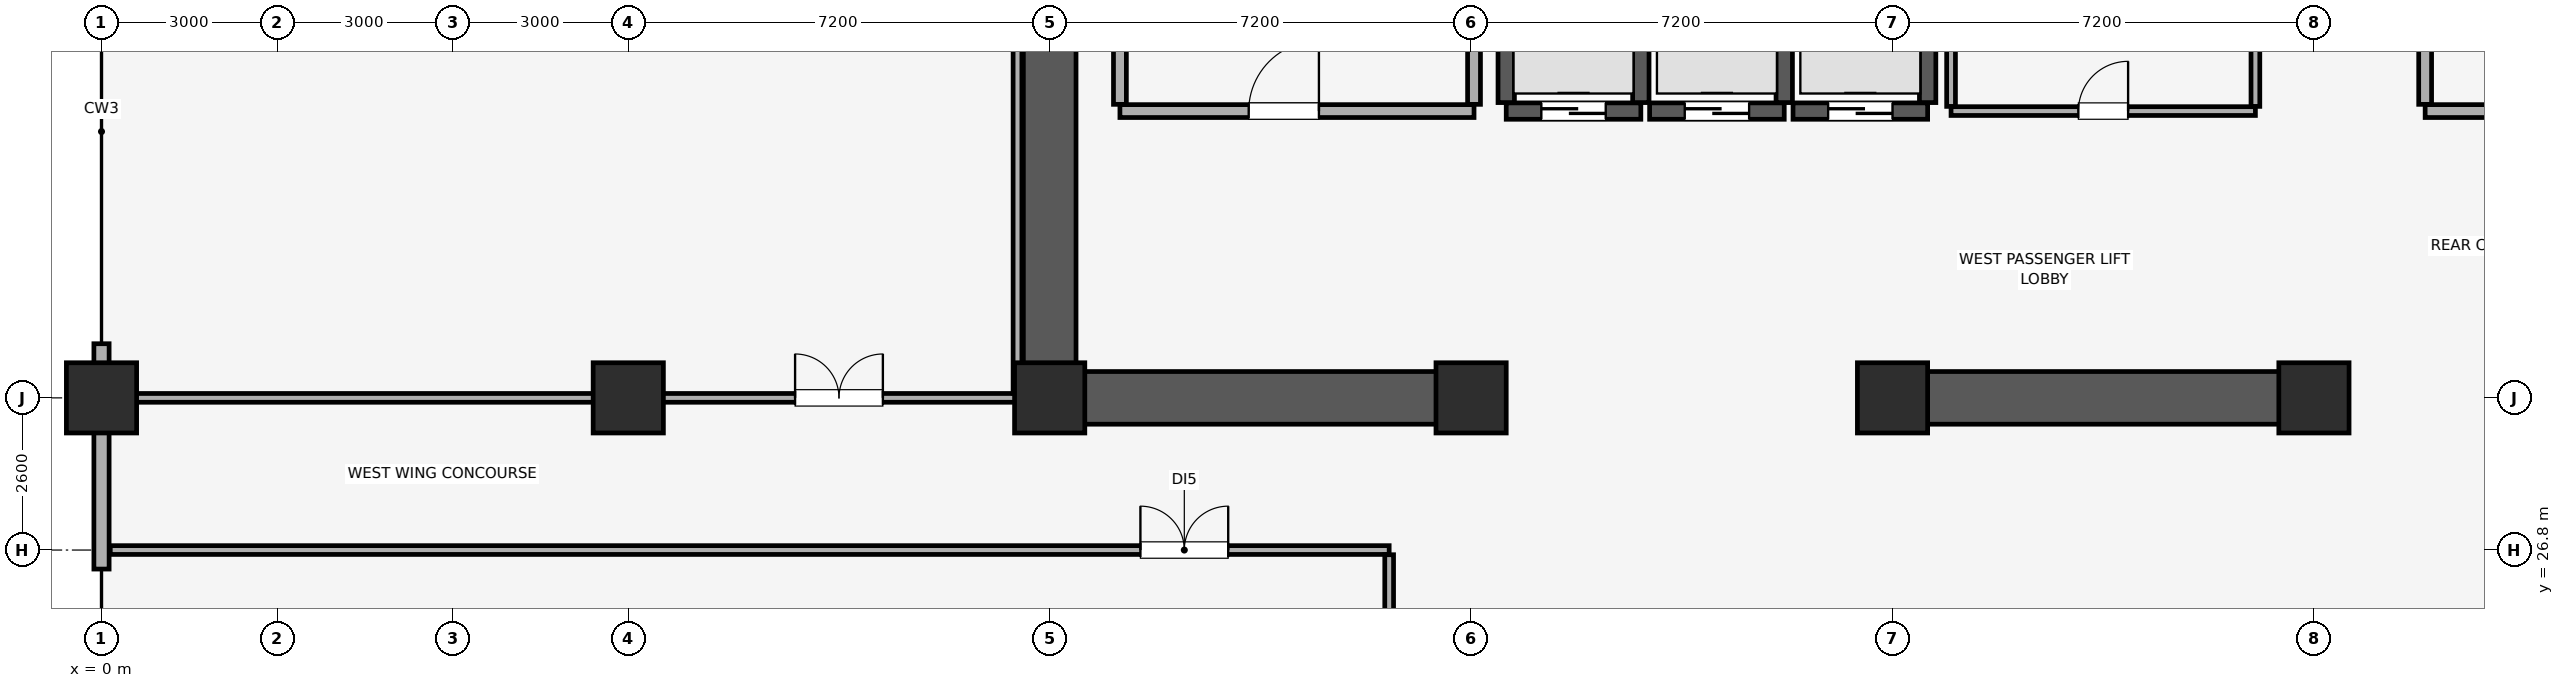
"""IFC4 building model, lengths in metres.
Left out: names, types, materials, properties, quantities, classifications, styles, units other than length and angle.
Written with IfcOpenShell. Run it as: python <this file> out.ifc"""

import sys

from ifc_helpers import new_model, si_unit, direction, frame, frame_2d, origin, origin_2d, place, context, subcontext, project, spatial, rectangle, extrude, element, fill, save


model = new_model("IFC4")
c1 = context("Model", 3, precision=1e-05, world=origin(), true_north=direction((0.0, 1.0)))
c2 = subcontext(c1, "Body", "Model", "MODEL_VIEW")
j1 = project(units=[si_unit("LENGTHUNIT", "METRE"), si_unit("PLANEANGLEUNIT", "RADIAN")], contexts=[c1])
p1 = place(None, origin())
s1 = spatial("IfcSite", under=j1, at=p1, CompositionType="ELEMENT")
p2 = place(p1, origin())
s2 = spatial("IfcBuilding", under=s1, at=p2, CompositionType="ELEMENT")
p3 = place(p2, frame((0.0, 0.0, 130.55)))
s3 = spatial("IfcBuildingStorey", under=s2, at=p3, CompositionType="ELEMENT", Elevation=130.55)
for number, where, z_axis, x_axis in (
    (1, (0.0, 29.4, 0.0), (0.0, 0.0, 1.0), (1.0, 0.0, 0.0)),
    (2, (9.0, 29.4, 0.0), (0.0, 0.0, 1.0), (1.0, 0.0, 0.0)),
    (3, (16.2, 29.4, 0.0), (0.0, 0.0, 1.0), (1.0, 0.0, 0.0)),
    (4, (23.4, 29.4, 0.0), (0.0, 0.0, 1.0), (1.0, 0.0, 0.0)),
    (5, (30.6, 29.4, 0.0), (0.0, 0.0, 1.0), (1.0, 0.0, 0.0)),
    (6, (37.8, 29.4, 0.0), (0.0, 0.0, 1.0), (1.0, 0.0, 0.0)),
):
    element("IfcColumn", number, at=place(p3, frame(where, z_axis=z_axis, x_axis=x_axis)), inside=s3, PredefinedType="COLUMN", context=c2, shape_type="SweptSolid", body=[
        extrude(rectangle(XDim=1.2, YDim=1.2, at=origin_2d()), origin(), (0.0, 0.0, 1.0), 4.56),
    ])
p4 = place(p3, frame((0.0, 30.325, 0.0), z_axis=(0.0, 0.0, 1.0), x_axis=(0.0, -1.0, 0.0)))
e7 = element("IfcWall", 7, at=p4, inside=s3, PredefinedType="SOLIDWALL", context=c2, shape_type="SweptSolid", body=[
    extrude(rectangle(XDim=3.85, YDim=0.26, at=frame_2d((1.925, 0.0))), origin(), (0.0, 0.0, 1.0), 4.52),
])
p5 = place(p3, frame((16.2, 29.4, 0.0), z_axis=(0.0, 0.0, 1.0), x_axis=(0.0, 1.0, 0.0)))
e8 = element("IfcWall", 8, at=p5, inside=s3, PredefinedType="SHEAR", context=c2, shape_type="SweptSolid", body=[
    extrude(rectangle(XDim=19.2, YDim=0.9, at=frame_2d((9.6, 0.0))), origin(), (0.0, 0.0, 1.0), 4.52),
])
p6 = place(p3, frame((16.655, 29.4, 0.0), z_axis=(0.0, 0.0, 1.0), x_axis=(1.0, 0.0, 0.0)))
e9 = element("IfcWall", 9, at=p6, inside=s3, PredefinedType="SHEAR", context=c2, shape_type="SweptSolid", body=[
    extrude(rectangle(XDim=6.945, YDim=0.9, at=frame_2d((3.473, 0.0))), origin(), (0.0, 0.0, 1.0), 4.52),
])
p7 = place(p3, frame((30.4, 29.4, 0.0), z_axis=(0.0, 0.0, 1.0), x_axis=(1.0, 0.0, 0.0)))
e10 = element("IfcWall", 10, at=p7, inside=s3, PredefinedType="SHEAR", context=c2, shape_type="SweptSolid", body=[
    extrude(rectangle(XDim=7.6, YDim=0.9, at=frame_2d((3.8, 0.0))), origin(), (0.0, 0.0, 1.0), 4.52),
])
p8 = place(p3, frame((24.0, 34.3, 0.0), z_axis=(0.0, 0.0, 1.0), x_axis=(1.0, 0.0, 0.0)))
e11 = element("IfcWall", 11, at=p8, inside=s3, PredefinedType="SHEAR", context=c2, shape_type="SweptSolid", body=[
    extrude(rectangle(XDim=2.3, YDim=0.28, at=frame_2d((1.15, 0.0))), origin(), (0.0, 0.0, 1.0), 4.52),
])
p9 = place(p8, frame((0.6, 0.0, 0.0)))
e12 = element("IfcOpeningElement", 12, at=p9, cuts=e11, PredefinedType="OPENING", context=c2, shape_type="SweptSolid", body=[
    extrude(rectangle(XDim=1.1, YDim=2.2, at=frame_2d((0.55, 1.1))), frame((0.0, 0.15, 0.0), z_axis=(0.0, -1.0, 0.0), x_axis=(1.0, 0.0, 0.0)), (0.0, 0.0, 1.0), 0.3),
])
for number, where, z_axis, x_axis in (
    (13, (24.0, 34.445, 0.0), (0.0, 0.0, 1.0), (0.0, 1.0, 0.0)),
    (14, (26.3, 34.445, 0.0), (0.0, 0.0, 1.0), (0.0, 1.0, 0.0)),
):
    element("IfcWall", number, at=place(p3, frame(where, z_axis=z_axis, x_axis=x_axis)), inside=s3, PredefinedType="SHEAR", context=c2, shape_type="SweptSolid", body=[
        extrude(rectangle(XDim=2.01, YDim=0.28, at=frame_2d((1.005, 0.0))), origin(), (0.0, 0.0, 1.0), 4.52),
    ])
p10 = place(p3, frame((26.45, 34.3, 0.0), z_axis=(0.0, 0.0, 1.0), x_axis=(1.0, 0.0, 0.0)))
e15 = element("IfcWall", 15, at=p10, inside=s3, PredefinedType="SHEAR", context=c2, shape_type="SweptSolid", body=[
    extrude(rectangle(XDim=2.3, YDim=0.28, at=frame_2d((1.15, 0.0))), origin(), (0.0, 0.0, 1.0), 4.52),
])
p11 = place(p10, frame((0.6, 0.0, 0.0)))
e16 = element("IfcOpeningElement", 16, at=p11, cuts=e15, PredefinedType="OPENING", context=c2, shape_type="SweptSolid", body=[
    extrude(rectangle(XDim=1.1, YDim=2.2, at=frame_2d((0.55, 1.1))), frame((0.0, 0.15, 0.0), z_axis=(0.0, -1.0, 0.0), x_axis=(1.0, 0.0, 0.0)), (0.0, 0.0, 1.0), 0.3),
])
p12 = place(p3, frame((28.75, 34.445, 0.0), z_axis=(0.0, 0.0, 1.0), x_axis=(0.0, 1.0, 0.0)))
e17 = element("IfcWall", 17, at=p12, inside=s3, PredefinedType="SHEAR", context=c2, shape_type="SweptSolid", body=[
    extrude(rectangle(XDim=2.01, YDim=0.28, at=frame_2d((1.005, 0.0))), origin(), (0.0, 0.0, 1.0), 4.52),
])
p13 = place(p3, frame((28.9, 34.3, 0.0), z_axis=(0.0, 0.0, 1.0), x_axis=(1.0, 0.0, 0.0)))
e18 = element("IfcWall", 18, at=p13, inside=s3, PredefinedType="SHEAR", context=c2, shape_type="SweptSolid", body=[
    extrude(rectangle(XDim=2.3, YDim=0.28, at=frame_2d((1.15, 0.0))), origin(), (0.0, 0.0, 1.0), 4.52),
])
p14 = place(p13, frame((0.6, 0.0, 0.0)))
e19 = element("IfcOpeningElement", 19, at=p14, cuts=e18, PredefinedType="OPENING", context=c2, shape_type="SweptSolid", body=[
    extrude(rectangle(XDim=1.1, YDim=2.2, at=frame_2d((0.55, 1.1))), frame((0.0, 0.15, 0.0), z_axis=(0.0, -1.0, 0.0), x_axis=(1.0, 0.0, 0.0)), (0.0, 0.0, 1.0), 0.3),
])
p15 = place(p3, frame((31.2, 34.445, 0.0), z_axis=(0.0, 0.0, 1.0), x_axis=(0.0, 1.0, 0.0)))
e20 = element("IfcWall", 20, at=p15, inside=s3, PredefinedType="SHEAR", context=c2, shape_type="SweptSolid", body=[
    extrude(rectangle(XDim=2.01, YDim=0.28, at=frame_2d((1.005, 0.0))), origin(), (0.0, 0.0, 1.0), 4.52),
])
p16 = place(p3, frame((17.4, 34.3, 0.0), z_axis=(0.0, 0.0, 1.0), x_axis=(1.0, 0.0, 0.0)))
e21 = element("IfcWall", 21, at=p16, inside=s3, PredefinedType="PARTITIONING", context=c2, shape_type="SweptSolid", body=[
    extrude(rectangle(XDim=6.05, YDim=0.22, at=frame_2d((3.025, 0.0))), origin(), (0.0, 0.0, 1.0), 4.52),
])
p17 = place(p16, frame((2.2, 0.0, 0.0)))
e22 = element("IfcOpeningElement", 22, at=p17, cuts=e21, PredefinedType="OPENING", context=c2, shape_type="SweptSolid", body=[
    extrude(rectangle(XDim=1.2, YDim=2.15, at=frame_2d((0.6, 1.075))), frame((0.0, 0.12, 0.0), z_axis=(0.0, -1.0, 0.0), x_axis=(1.0, 0.0, 0.0)), (0.0, 0.0, 1.0), 0.24),
])
p18 = place(p3, frame((17.4, 34.415, 0.0), z_axis=(0.0, 0.0, 1.0), x_axis=(0.0, 1.0, 0.0)))
e23 = element("IfcWall", 23, at=p18, inside=s3, PredefinedType="PARTITIONING", context=c2, shape_type="SweptSolid", body=[
    extrude(rectangle(XDim=5.43, YDim=0.22, at=frame_2d((2.715, 0.0))), origin(), (0.0, 0.0, 1.0), 4.52),
])
p19 = place(p3, frame((23.45, 34.415, 0.0), z_axis=(0.0, 0.0, 1.0), x_axis=(0.0, 1.0, 0.0)))
e24 = element("IfcWall", 24, at=p19, inside=s3, PredefinedType="PARTITIONING", context=c2, shape_type="SweptSolid", body=[
    extrude(rectangle(XDim=5.64, YDim=0.22, at=frame_2d((2.82, 0.0))), origin(), (0.0, 0.0, 1.0), 4.52),
])
p20 = place(p3, frame((39.7, 34.3, 0.0), z_axis=(0.0, 0.0, 1.0), x_axis=(1.0, 0.0, 0.0)))
e25 = element("IfcWall", 25, at=p20, inside=s3, PredefinedType="PARTITIONING", context=c2, shape_type="SweptSolid", body=[
    extrude(rectangle(XDim=4.6, YDim=0.22, at=frame_2d((2.3, 0.0))), origin(), (0.0, 0.0, 1.0), 4.52),
])
p21 = place(p20, frame((1.7, 0.0, 0.0)))
e26 = element("IfcOpeningElement", 26, at=p21, cuts=e25, PredefinedType="OPENING", context=c2, shape_type="SweptSolid", body=[
    extrude(rectangle(XDim=1.2, YDim=2.15, at=frame_2d((0.6, 1.075))), frame((0.0, 0.12, 0.0), z_axis=(0.0, -1.0, 0.0), x_axis=(1.0, 0.0, 0.0)), (0.0, 0.0, 1.0), 0.24),
])
p22 = place(p3, frame((39.7, 34.415, 0.0), z_axis=(0.0, 0.0, 1.0), x_axis=(0.0, 1.0, 0.0)))
e27 = element("IfcWall", 27, at=p22, inside=s3, PredefinedType="PARTITIONING", context=c2, shape_type="SweptSolid", body=[
    extrude(rectangle(XDim=5.785, YDim=0.22, at=frame_2d((2.893, 0.0))), origin(), (0.0, 0.0, 1.0), 4.52),
])
p23 = place(p3, frame((31.6, 34.3, 0.0), z_axis=(0.0, 0.0, 1.0), x_axis=(1.0, 0.0, 0.0)))
e28 = element("IfcWall", 28, at=p23, inside=s3, PredefinedType="PARTITIONING", context=c2, shape_type="SweptSolid", body=[
    extrude(rectangle(XDim=5.2, YDim=0.15, at=frame_2d((2.6, 0.0))), origin(), (0.0, 0.0, 1.0), 4.52),
])
p24 = place(p23, frame((2.175, 0.0, 0.0)))
e29 = element("IfcOpeningElement", 29, at=p24, cuts=e28, PredefinedType="OPENING", context=c2, shape_type="SweptSolid", body=[
    extrude(rectangle(XDim=0.85, YDim=2.1, at=frame_2d((0.425, 1.05))), frame((0.0, 0.085, 0.0), z_axis=(0.0, -1.0, 0.0), x_axis=(1.0, 0.0, 0.0)), (0.0, 0.0, 1.0), 0.17),
])
for number, where, z_axis, x_axis in (
    (30, (31.6, 34.38, 0.0), (0.0, 0.0, 1.0), (0.0, 1.0, 0.0)),
    (31, (36.8, 34.38, 0.0), (0.0, 0.0, 1.0), (0.0, 1.0, 0.0)),
):
    element("IfcWall", number, at=place(p3, frame(where, z_axis=z_axis, x_axis=x_axis)), inside=s3, PredefinedType="PARTITIONING", context=c2, shape_type="SweptSolid", body=[
        extrude(rectangle(XDim=4.94, YDim=0.15, at=frame_2d((2.47, 0.0))), origin(), (0.0, 0.0, 1.0), 4.52),
    ])
p25 = place(p3, frame((0.15, 26.8, 0.0), z_axis=(0.0, 0.0, 1.0), x_axis=(1.0, 0.0, 0.0)))
e32 = element("IfcWall", 32, at=p25, inside=s3, PredefinedType="PARTITIONING", context=c2, shape_type="SweptSolid", body=[
    extrude(rectangle(XDim=21.85, YDim=0.15, at=frame_2d((10.925, 0.0))), origin(), (0.0, 0.0, 1.0), 4.52),
])
p26 = place(p25, frame((17.6, 0.0, 0.0)))
e33 = element("IfcOpeningElement", 33, at=p26, cuts=e32, PredefinedType="OPENING", context=c2, shape_type="SweptSolid", body=[
    extrude(rectangle(XDim=1.5, YDim=2.25, at=frame_2d((0.75, 1.125))), frame((0.0, 0.085, 0.0), z_axis=(0.0, -1.0, 0.0), x_axis=(1.0, 0.0, 0.0)), (0.0, 0.0, 1.0), 0.17),
])
p27 = place(p3, frame((22.0, 16.28, 0.0), z_axis=(0.0, 0.0, 1.0), x_axis=(0.0, 1.0, 0.0)))
e34 = element("IfcWall", 34, at=p27, inside=s3, PredefinedType="PARTITIONING", context=c2, shape_type="SweptSolid", body=[
    extrude(rectangle(XDim=10.44, YDim=0.15, at=frame_2d((5.22, 0.0))), origin(), (0.0, 0.0, 1.0), 4.52),
])
p28 = place(p3, frame((0.15, 29.4, 0.0), z_axis=(0.0, 0.0, 1.0), x_axis=(1.0, 0.0, 0.0)))
e35 = element("IfcWall", 35, at=p28, inside=s3, PredefinedType="PARTITIONING", context=c2, shape_type="SweptSolid", body=[
    extrude(rectangle(XDim=15.5, YDim=0.15, at=frame_2d((7.75, 0.0))), origin(), (0.0, 0.0, 1.0), 3.4),
])
p29 = place(p28, frame((11.7, 0.0, 0.0)))
e36 = element("IfcOpeningElement", 36, at=p29, cuts=e35, PredefinedType="OPENING", context=c2, shape_type="SweptSolid", body=[
    extrude(rectangle(XDim=1.5, YDim=2.25, at=frame_2d((0.75, 1.125))), frame((0.0, 0.085, 0.0), z_axis=(0.0, -1.0, 0.0), x_axis=(1.0, 0.0, 0.0)), (0.0, 0.0, 1.0), 0.17),
])
p30 = place(p3, frame((15.65, 29.48, 0.0), z_axis=(0.0, 0.0, 1.0), x_axis=(0.0, 1.0, 0.0)))
e37 = element("IfcWall", 37, at=p30, inside=s3, PredefinedType="PARTITIONING", context=c2, shape_type="SweptSolid", body=[
    extrude(rectangle(XDim=19.37, YDim=0.15, at=frame_2d((9.685, 0.0))), origin(), (0.0, 0.0, 1.0), 4.52),
])
p31 = place(p9, origin())
e38 = element("IfcDoor", 38, at=p31, inside=s3, OperationType="DOUBLE_DOOR_SLIDING", PredefinedType="DOOR", context=c2, shape_type="SweptSolid", body=[
    extrude(rectangle(XDim=1.1, YDim=2.2, at=frame_2d((0.55, 1.1))), frame((0.0, 0.025, 0.0), z_axis=(0.0, -1.0, 0.0), x_axis=(1.0, 0.0, 0.0)), (0.0, 0.0, 1.0), 0.05),
])
fill(e12, e38)
p32 = place(p11, origin())
e39 = element("IfcDoor", 39, at=p32, inside=s3, OperationType="DOUBLE_DOOR_SLIDING", PredefinedType="DOOR", context=c2, shape_type="SweptSolid", body=[
    extrude(rectangle(XDim=1.1, YDim=2.2, at=frame_2d((0.55, 1.1))), frame((0.0, 0.025, 0.0), z_axis=(0.0, -1.0, 0.0), x_axis=(1.0, 0.0, 0.0)), (0.0, 0.0, 1.0), 0.05),
])
fill(e16, e39)
p33 = place(p14, origin())
e40 = element("IfcDoor", 40, at=p33, inside=s3, OperationType="DOUBLE_DOOR_SLIDING", PredefinedType="DOOR", context=c2, shape_type="SweptSolid", body=[
    extrude(rectangle(XDim=1.1, YDim=2.2, at=frame_2d((0.55, 1.1))), frame((0.0, 0.025, 0.0), z_axis=(0.0, -1.0, 0.0), x_axis=(1.0, 0.0, 0.0)), (0.0, 0.0, 1.0), 0.05),
])
fill(e19, e40)
p34 = place(p17, origin())
e41 = element("IfcDoor", 41, at=p34, inside=s3, OperationType="SINGLE_SWING_RIGHT", PredefinedType="DOOR", context=c2, shape_type="SweptSolid", body=[
    extrude(rectangle(XDim=1.2, YDim=2.15, at=frame_2d((0.6, 1.075))), frame((0.0, 0.025, 0.0), z_axis=(0.0, -1.0, 0.0), x_axis=(1.0, 0.0, 0.0)), (0.0, 0.0, 1.0), 0.05),
])
fill(e22, e41)
p35 = place(p24, origin())
e42 = element("IfcDoor", 42, at=p35, inside=s3, OperationType="SINGLE_SWING_RIGHT", PredefinedType="DOOR", context=c2, shape_type="SweptSolid", body=[
    extrude(rectangle(XDim=0.85, YDim=2.1, at=frame_2d((0.425, 1.05))), frame((0.0, 0.025, 0.0), z_axis=(0.0, -1.0, 0.0), x_axis=(1.0, 0.0, 0.0)), (0.0, 0.0, 1.0), 0.05),
])
fill(e29, e42)
p36 = place(p26, origin())
e43 = element("IfcDoor", 43, at=p36, inside=s3, OperationType="DOUBLE_DOOR_SINGLE_SWING", PredefinedType="DOOR", context=c2, shape_type="SweptSolid", body=[
    extrude(rectangle(XDim=1.5, YDim=2.25, at=frame_2d((0.75, 1.125))), frame((0.0, 0.025, 0.0), z_axis=(0.0, -1.0, 0.0), x_axis=(1.0, 0.0, 0.0)), (0.0, 0.0, 1.0), 0.05),
])
fill(e33, e43)
p37 = place(p29, origin())
e44 = element("IfcDoor", 44, at=p37, inside=s3, OperationType="DOUBLE_DOOR_SINGLE_SWING", PredefinedType="DOOR", context=c2, shape_type="SweptSolid", body=[
    extrude(rectangle(XDim=1.5, YDim=2.25, at=frame_2d((0.75, 1.125))), frame((0.0, 0.025, 0.0), z_axis=(0.0, -1.0, 0.0), x_axis=(1.0, 0.0, 0.0)), (0.0, 0.0, 1.0), 0.05),
])
fill(e36, e44)
save(model, sys.argv[1])
